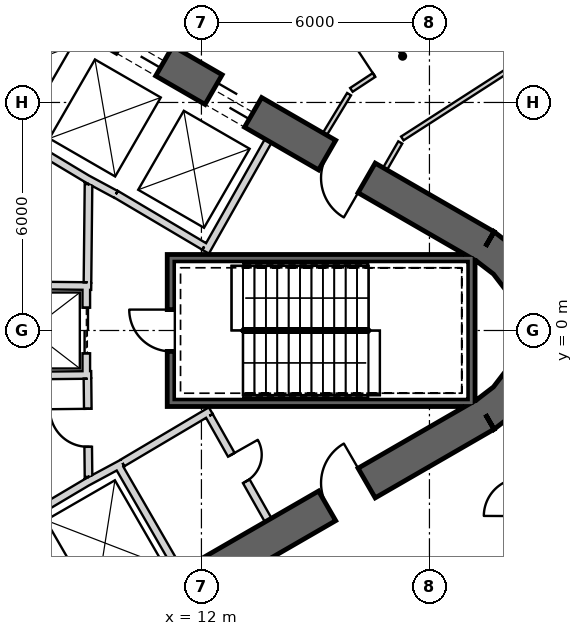
"""IFC4 building model, lengths in metres.
Left out: names, types, materials, properties, quantities, classifications, styles, units other than length and angle.
Written with IfcOpenShell. Run it as: python <this file> out.ifc"""

import sys

from ifc_helpers import new_model, si_unit, direction, frame, frame_2d, origin, place, context, subcontext, project, spatial, polyline, rectangle, outline, extrude, element, fill, save


model = new_model("IFC4")
c1 = context("Model", 3, precision=1e-05, world=origin(), true_north=direction((0.0, 1.0)))
c2 = subcontext(c1, "Body", "Model", "MODEL_VIEW")
j1 = project(units=[si_unit("LENGTHUNIT", "METRE"), si_unit("PLANEANGLEUNIT", "RADIAN")], contexts=[c1])
p1 = place(None, origin())
s1 = spatial("IfcSite", under=j1, at=p1, CompositionType="ELEMENT")
p2 = place(p1, origin())
s2 = spatial("IfcBuilding", under=s1, at=p2, CompositionType="ELEMENT")
p3 = place(p2, origin())
s3 = spatial("IfcBuildingStorey", under=s2, at=p3, CompositionType="ELEMENT", Elevation=0.0)
p4 = place(p3, frame((19.475, 2.208, 0.0), z_axis=(0.0, 0.0, 1.0), x_axis=(-0.866028369851, 0.499994862586, 0.0)))
e1 = element("IfcWall", 1, at=p4, inside=s3, PredefinedType="SHEAR", context=c2, shape_type="SweptSolid", body=[
    extrude(rectangle(XDim=31.523, YDim=0.9, at=frame_2d((15.762, 0.0))), origin(), (0.0, 0.0, 1.0), 9.0),
])
p5 = place(p4, frame((7.062, 0.0, 0.0)))
e2 = element("IfcOpeningElement", 2, at=p5, cuts=e1, PredefinedType="OPENING", context=c2, shape_type="SweptSolid", body=[
    extrude(rectangle(XDim=1.2, YDim=2.4, at=frame_2d((0.6, 1.2))), frame((0.0, 0.46, 0.0), z_axis=(0.0, -1.0, 0.0), x_axis=(1.0, 0.0, 0.0)), (0.0, 0.0, 1.0), 0.92),
])
p6 = place(p4, frame((9.762, 0.0, 0.0)))
e3 = element("IfcOpeningElement", 3, at=p6, cuts=e1, PredefinedType="OPENING", context=c2, shape_type="SweptSolid", body=[
    extrude(rectangle(XDim=1.2, YDim=2.4, at=frame_2d((0.6, 1.2))), frame((0.0, 0.46, 0.0), z_axis=(0.0, -1.0, 0.0), x_axis=(1.0, 0.0, 0.0)), (0.0, 0.0, 1.0), 0.92),
])
p7 = place(p4, frame((12.462, 0.0, 0.0)))
e4 = element("IfcOpeningElement", 4, at=p7, cuts=e1, PredefinedType="OPENING", context=c2, shape_type="SweptSolid", body=[
    extrude(rectangle(XDim=1.2, YDim=2.4, at=frame_2d((0.6, 1.2))), frame((0.0, 0.46, 0.0), z_axis=(0.0, -1.0, 0.0), x_axis=(1.0, 0.0, 0.0)), (0.0, 0.0, 1.0), 0.92),
])
p8 = place(p4, frame((15.162, 0.0, 0.0)))
e5 = element("IfcOpeningElement", 5, at=p8, cuts=e1, PredefinedType="OPENING", context=c2, shape_type="SweptSolid", body=[
    extrude(rectangle(XDim=1.2, YDim=2.4, at=frame_2d((0.6, 1.2))), frame((0.0, 0.46, 0.0), z_axis=(0.0, -1.0, 0.0), x_axis=(1.0, 0.0, 0.0)), (0.0, 0.0, 1.0), 0.92),
])
p9 = place(p4, frame((17.862, 0.0, 0.0)))
e6 = element("IfcOpeningElement", 6, at=p9, cuts=e1, PredefinedType="OPENING", context=c2, shape_type="SweptSolid", body=[
    extrude(rectangle(XDim=1.2, YDim=2.4, at=frame_2d((0.6, 1.2))), frame((0.0, 0.46, 0.0), z_axis=(0.0, -1.0, 0.0), x_axis=(1.0, 0.0, 0.0)), (0.0, 0.0, 1.0), 0.92),
])
p10 = place(p4, frame((20.562, 0.0, 0.0)))
e7 = element("IfcOpeningElement", 7, at=p10, cuts=e1, PredefinedType="OPENING", context=c2, shape_type="SweptSolid", body=[
    extrude(rectangle(XDim=1.2, YDim=2.4, at=frame_2d((0.6, 1.2))), frame((0.0, 0.46, 0.0), z_axis=(0.0, -1.0, 0.0), x_axis=(1.0, 0.0, 0.0)), (0.0, 0.0, 1.0), 0.92),
])
p11 = place(p4, frame((23.262, 0.0, 0.0)))
e8 = element("IfcOpeningElement", 8, at=p11, cuts=e1, PredefinedType="OPENING", context=c2, shape_type="SweptSolid", body=[
    extrude(rectangle(XDim=1.2, YDim=2.4, at=frame_2d((0.6, 1.2))), frame((0.0, 0.46, 0.0), z_axis=(0.0, -1.0, 0.0), x_axis=(1.0, 0.0, 0.0)), (0.0, 0.0, 1.0), 0.92),
])
p12 = place(p4, frame((3.612, 0.0, 0.0)))
e9 = element("IfcOpeningElement", 9, at=p12, cuts=e1, PredefinedType="OPENING", context=c2, shape_type="SweptSolid", body=[
    extrude(rectangle(XDim=1.2, YDim=2.4, at=frame_2d((0.6, 1.2))), frame((0.0, 0.46, 0.0), z_axis=(0.0, -1.0, 0.0), x_axis=(1.0, 0.0, 0.0)), (0.0, 0.0, 1.0), 0.92),
])
p13 = place(p4, frame((26.712, 0.0, 0.0)))
e10 = element("IfcOpeningElement", 10, at=p13, cuts=e1, PredefinedType="OPENING", context=c2, shape_type="SweptSolid", body=[
    extrude(rectangle(XDim=1.2, YDim=2.4, at=frame_2d((0.6, 1.2))), frame((0.0, 0.46, 0.0), z_axis=(0.0, -1.0, 0.0), x_axis=(1.0, 0.0, 0.0)), (0.0, 0.0, 1.0), 0.92),
])
p14 = place(p3, frame((-7.825, -17.97, 0.0), z_axis=(0.0, 0.0, 1.0), x_axis=(0.866028369851, 0.499994862586, 0.0)))
e11 = element("IfcWall", 11, at=p14, inside=s3, PredefinedType="SHEAR", context=c2, shape_type="SweptSolid", body=[
    extrude(rectangle(XDim=31.523, YDim=0.9, at=frame_2d((15.762, 0.0))), origin(), (0.0, 0.0, 1.0), 9.0),
])
p15 = place(p14, frame((7.062, 0.0, 0.0)))
e12 = element("IfcOpeningElement", 12, at=p15, cuts=e11, PredefinedType="OPENING", context=c2, shape_type="SweptSolid", body=[
    extrude(rectangle(XDim=1.2, YDim=2.4, at=frame_2d((0.6, 1.2))), frame((0.0, 0.46, 0.0), z_axis=(0.0, -1.0, 0.0), x_axis=(1.0, 0.0, 0.0)), (0.0, 0.0, 1.0), 0.92),
])
p16 = place(p14, frame((9.762, 0.0, 0.0)))
e13 = element("IfcOpeningElement", 13, at=p16, cuts=e11, PredefinedType="OPENING", context=c2, shape_type="SweptSolid", body=[
    extrude(rectangle(XDim=1.2, YDim=2.4, at=frame_2d((0.6, 1.2))), frame((0.0, 0.46, 0.0), z_axis=(0.0, -1.0, 0.0), x_axis=(1.0, 0.0, 0.0)), (0.0, 0.0, 1.0), 0.92),
])
p17 = place(p14, frame((12.462, 0.0, 0.0)))
e14 = element("IfcOpeningElement", 14, at=p17, cuts=e11, PredefinedType="OPENING", context=c2, shape_type="SweptSolid", body=[
    extrude(rectangle(XDim=1.2, YDim=2.4, at=frame_2d((0.6, 1.2))), frame((0.0, 0.46, 0.0), z_axis=(0.0, -1.0, 0.0), x_axis=(1.0, 0.0, 0.0)), (0.0, 0.0, 1.0), 0.92),
])
p18 = place(p14, frame((15.162, 0.0, 0.0)))
e15 = element("IfcOpeningElement", 15, at=p18, cuts=e11, PredefinedType="OPENING", context=c2, shape_type="SweptSolid", body=[
    extrude(rectangle(XDim=1.2, YDim=2.4, at=frame_2d((0.6, 1.2))), frame((0.0, 0.46, 0.0), z_axis=(0.0, -1.0, 0.0), x_axis=(1.0, 0.0, 0.0)), (0.0, 0.0, 1.0), 0.92),
])
p19 = place(p14, frame((17.862, 0.0, 0.0)))
e16 = element("IfcOpeningElement", 16, at=p19, cuts=e11, PredefinedType="OPENING", context=c2, shape_type="SweptSolid", body=[
    extrude(rectangle(XDim=1.2, YDim=2.4, at=frame_2d((0.6, 1.2))), frame((0.0, 0.46, 0.0), z_axis=(0.0, -1.0, 0.0), x_axis=(1.0, 0.0, 0.0)), (0.0, 0.0, 1.0), 0.92),
])
p20 = place(p14, frame((20.562, 0.0, 0.0)))
e17 = element("IfcOpeningElement", 17, at=p20, cuts=e11, PredefinedType="OPENING", context=c2, shape_type="SweptSolid", body=[
    extrude(rectangle(XDim=1.2, YDim=2.4, at=frame_2d((0.6, 1.2))), frame((0.0, 0.46, 0.0), z_axis=(0.0, -1.0, 0.0), x_axis=(1.0, 0.0, 0.0)), (0.0, 0.0, 1.0), 0.92),
])
p21 = place(p14, frame((26.712, 0.0, 0.0)))
e18 = element("IfcOpeningElement", 18, at=p21, cuts=e11, PredefinedType="OPENING", context=c2, shape_type="SweptSolid", body=[
    extrude(rectangle(XDim=1.2, YDim=2.4, at=frame_2d((0.6, 1.2))), frame((0.0, 0.46, 0.0), z_axis=(0.0, -1.0, 0.0), x_axis=(1.0, 0.0, 0.0)), (0.0, 0.0, 1.0), 0.92),
])
p22 = place(p14, frame((3.612, 0.0, 0.0)))
e19 = element("IfcOpeningElement", 19, at=p22, cuts=e11, PredefinedType="OPENING", context=c2, shape_type="SweptSolid", body=[
    extrude(rectangle(XDim=1.2, YDim=2.4, at=frame_2d((0.6, 1.2))), frame((0.0, 0.46, 0.0), z_axis=(0.0, -1.0, 0.0), x_axis=(1.0, 0.0, 0.0)), (0.0, 0.0, 1.0), 0.92),
])
p23 = place(p3, origin())
e20 = element("IfcWall", 20, at=p23, inside=s3, PredefinedType="SHEAR", context=c2, shape_type="SweptSolid", body=[
    extrude(outline(polyline([(19.7, -2.598), (20.321, -2.121), (20.798, -1.5), (21.098, -0.777), (21.2, 0.0), (21.098, 0.777), (20.798, 1.5), (20.321, 2.121), (19.7, 2.598), (19.25, 1.819), (19.685, 1.485), (20.019, 1.05), (20.229, 0.543), (20.3, 0.0), (20.229, -0.543), (20.019, -1.05), (19.685, -1.485), (19.25, -1.819), (19.7, -2.598)])), origin(), (0.0, 0.0, 1.0), 9.0),
])
p24 = place(p3, frame((12.11, 2.073, 0.0), z_axis=(0.0, 0.0, 1.0), x_axis=(0.49196600604, 0.870614408852, 0.0)))
e21 = element("IfcWall", 21, at=p24, inside=s3, PredefinedType="PLUMBINGWALL", context=c2, shape_type="SweptSolid", body=[
    extrude(rectangle(XDim=3.35, YDim=0.2, at=frame_2d((1.675, 0.0))), origin(), (0.0, 0.0, 1.0), 8.7),
])
p25 = place(p3, frame((12.073, 2.211, 0.0), z_axis=(0.0, 0.0, 1.0), x_axis=(-0.860438357912, 0.509554542943, 0.0)))
e22 = element("IfcWall", 22, at=p25, inside=s3, PredefinedType="PLUMBINGWALL", context=c2, shape_type="SweptSolid", body=[
    extrude(rectangle(XDim=2.7, YDim=0.2, at=frame_2d((1.35, 0.0))), origin(), (0.0, 0.0, 1.0), 8.7),
])
p26 = place(p3, frame((9.748, 3.583, 0.0), z_axis=(0.0, 0.0, 1.0), x_axis=(-0.880917147855, 0.473270513147, 0.0)))
e23 = element("IfcWall", 23, at=p26, inside=s3, PredefinedType="PLUMBINGWALL", context=c2, shape_type="SweptSolid", body=[
    extrude(rectangle(XDim=0.878, YDim=0.2, at=frame_2d((0.439, 0.0))), origin(), (0.0, 0.0, 1.0), 8.7),
])
p27 = place(p3, frame((9.079, 3.937, 0.0), z_axis=(0.0, 0.0, 1.0), x_axis=(-0.857516281273, 0.51445682749, 0.0)))
e24 = element("IfcWall", 24, at=p27, inside=s3, PredefinedType="PLUMBINGWALL", context=c2, shape_type="SweptSolid", body=[
    extrude(rectangle(XDim=1.845, YDim=0.2, at=frame_2d((0.922, 0.0))), origin(), (0.0, 0.0, 1.0), 8.7),
])
p28 = place(p3, frame((9.795, -3.525, 0.0), z_axis=(0.0, 0.0, 1.0), x_axis=(0.499984717929, -0.866034226713, 0.0)))
e25 = element("IfcWall", 25, at=p28, inside=s3, PredefinedType="PLUMBINGWALL", context=c2, shape_type="SweptSolid", body=[
    extrude(rectangle(XDim=3.25, YDim=0.2, at=frame_2d((1.625, 0.0))), origin(), (0.0, 0.0, 1.0), 8.7),
])
p29 = place(p3, frame((8.974, -3.999, 0.0), z_axis=(0.0, 0.0, 1.0), x_axis=(0.880907015104, 0.473289373154, 0.0)))
e26 = element("IfcWall", 26, at=p29, inside=s3, PredefinedType="PLUMBINGWALL", context=c2, shape_type="SweptSolid", body=[
    extrude(rectangle(XDim=1.078, YDim=0.2, at=frame_2d((0.539, 0.0))), origin(), (0.0, 0.0, 1.0), 8.7),
])
p30 = place(p3, frame((7.493, -4.878, 0.0), z_axis=(0.0, 0.0, 1.0), x_axis=(0.859981807212, 0.510324691999, 0.0)))
e27 = element("IfcWall", 27, at=p30, inside=s3, PredefinedType="PLUMBINGWALL", context=c2, shape_type="SweptSolid", body=[
    extrude(rectangle(XDim=1.845, YDim=0.2, at=frame_2d((0.922, 0.0))), origin(), (0.0, 0.0, 1.0), 8.7),
])
p31 = place(p3, frame((19.2, 1.9, -0.4), z_axis=(0.0, 0.0, 1.0), x_axis=(-1.0, 0.0, 0.0)))
e28 = element("IfcWall", 28, at=p31, inside=s3, PredefinedType="SHEAR", context=c2, shape_type="SweptSolid", body=[
    extrude(rectangle(XDim=8.1, YDim=0.2, at=frame_2d((4.05, 0.0))), origin(), (0.0, 0.0, 1.0), 9.1),
])
p32 = place(p3, frame((19.1, -2.0, -0.4), z_axis=(0.0, 0.0, 1.0), x_axis=(0.0, 1.0, 0.0)))
e29 = element("IfcWall", 29, at=p32, inside=s3, PredefinedType="SHEAR", context=c2, shape_type="SweptSolid", body=[
    extrude(rectangle(XDim=3.8, YDim=0.2, at=frame_2d((1.9, 0.0))), origin(), (0.0, 0.0, 1.0), 9.1),
])
p33 = place(p3, frame((11.1, -1.9, -0.4), z_axis=(0.0, 0.0, 1.0), x_axis=(1.0, 0.0, 0.0)))
e30 = element("IfcWall", 30, at=p33, inside=s3, PredefinedType="SHEAR", context=c2, shape_type="SweptSolid", body=[
    extrude(rectangle(XDim=7.9, YDim=0.2, at=frame_2d((3.95, 0.0))), origin(), (0.0, 0.0, 1.0), 9.1),
])
p34 = place(p3, frame((11.2, -1.8, -0.4), z_axis=(0.0, 0.0, 1.0), x_axis=(0.0, 1.0, 0.0)))
e31 = element("IfcWall", 31, at=p34, inside=s3, PredefinedType="SHEAR", context=c2, shape_type="SweptSolid", body=[
    extrude(rectangle(XDim=3.6, YDim=0.2, at=frame_2d((1.8, 0.0))), origin(), (0.0, 0.0, 1.0), 9.1),
])
p35 = place(p34, frame((1.25, 0.0, 0.4)))
e32 = element("IfcOpeningElement", 32, at=p35, cuts=e31, PredefinedType="OPENING", context=c2, shape_type="SweptSolid", body=[
    extrude(rectangle(XDim=1.1, YDim=2.1, at=frame_2d((0.55, 1.05))), frame((0.0, 0.11, 0.0), z_axis=(0.0, -1.0, 0.0), x_axis=(1.0, 0.0, 0.0)), (0.0, 0.0, 1.0), 0.22),
])
p36 = place(p3, frame((8.97, 1.2, 0.0), z_axis=(0.0, 0.0, 1.0), x_axis=(0.0, -1.0, 0.0)))
e33 = element("IfcWall", 33, at=p36, inside=s3, PredefinedType="PLUMBINGWALL", context=c2, shape_type="SweptSolid", body=[
    extrude(rectangle(XDim=2.4, YDim=0.2, at=frame_2d((1.2, 0.0))), origin(), (0.0, 0.0, 1.0), 8.7),
])
p37 = place(p36, frame((0.6, 0.0, 0.0)))
e34 = element("IfcOpeningElement", 34, at=p37, cuts=e33, PredefinedType="OPENING", context=c2, shape_type="SweptSolid", body=[
    extrude(rectangle(XDim=1.2, YDim=2.4, at=frame_2d((0.6, 1.2))), frame((0.0, 0.11, 0.0), z_axis=(0.0, -1.0, 0.0), x_axis=(1.0, 0.0, 0.0)), (0.0, 0.0, 1.0), 0.22),
])
p38 = place(p3, frame((6.0, 1.2, 0.0), z_axis=(0.0, 0.0, 1.0), x_axis=(0.999949988, -0.010001074852, 0.0)))
e35 = element("IfcWall", 35, at=p38, inside=s3, PredefinedType="PLUMBINGWALL", context=c2, shape_type="SweptSolid", body=[
    extrude(rectangle(XDim=3.1, YDim=0.2, at=frame_2d((1.55, 0.0))), origin(), (0.0, 0.0, 1.0), 8.7),
])
p39 = place(p3, frame((5.9, -1.201, 0.0), z_axis=(0.0, 0.0, 1.0), x_axis=(0.999950064753, 0.009993397809, 0.0)))
e36 = element("IfcWall", 36, at=p39, inside=s3, PredefinedType="PLUMBINGWALL", context=c2, shape_type="SweptSolid", body=[
    extrude(rectangle(XDim=3.2, YDim=0.2, at=frame_2d((1.6, 0.0))), origin(), (0.0, 0.0, 1.0), 8.7),
])
p40 = place(p3, frame((12.245, -2.109, 0.0), z_axis=(0.0, 0.0, 1.0), x_axis=(-0.860414880418, -0.509594185166, 0.0)))
e37 = element("IfcWall", 37, at=p40, inside=s3, PredefinedType="PARTITIONING", context=c2, shape_type="SweptSolid", body=[
    extrude(rectangle(XDim=2.7, YDim=0.2, at=frame_2d((1.35, 0.0))), origin(), (0.0, 0.0, 1.0), 8.7),
])
p41 = place(p3, frame((13.758, -4.99, 0.0), z_axis=(0.0, 0.0, 1.0), x_axis=(-0.491993409184, 0.87059892334, 0.0)))
e38 = element("IfcWall", 38, at=p41, inside=s3, PredefinedType="PARTITIONING", context=c2, shape_type="SweptSolid", body=[
    extrude(rectangle(XDim=3.15, YDim=0.2, at=frame_2d((1.575, 0.0))), origin(), (0.0, 0.0, 1.0), 8.7),
])
p42 = place(p41, frame((1.175, 0.0, 0.0)))
e39 = element("IfcOpeningElement", 39, at=p42, cuts=e38, PredefinedType="OPENING", context=c2, shape_type="SweptSolid", body=[
    extrude(rectangle(XDim=0.8, YDim=2.1, at=frame_2d((0.4, 1.05))), frame((0.0, 0.11, 0.0), z_axis=(0.0, -1.0, 0.0), x_axis=(1.0, 0.0, 0.0)), (0.0, 0.0, 1.0), 0.22),
])
p43 = place(p3, frame((9.001, 1.27, 0.0), z_axis=(0.0, 0.0, 1.0), x_axis=(0.010784614026, 0.999941844359, 0.0)))
e40 = element("IfcWall", 40, at=p43, inside=s3, PredefinedType="PARTITIONING", context=c2, shape_type="SweptSolid", body=[
    extrude(rectangle(XDim=2.581, YDim=0.2, at=frame_2d((1.291, 0.0))), origin(), (0.0, 0.0, 1.0), 8.7),
])
p44 = place(p3, frame((9.029, -3.851, 0.0), z_axis=(0.0, 0.0, 1.0), x_axis=(-0.010783593937, 0.99994185536, 0.0)))
e41 = element("IfcWall", 41, at=p44, inside=s3, PredefinedType="PARTITIONING", context=c2, shape_type="SweptSolid", body=[
    extrude(rectangle(XDim=2.581, YDim=0.2, at=frame_2d((1.291, 0.0))), origin(), (0.0, 0.0, 1.0), 8.7),
])
p45 = place(p44, frame((0.791, 0.0, 0.0)))
e42 = element("IfcOpeningElement", 42, at=p45, cuts=e41, PredefinedType="OPENING", context=c2, shape_type="SweptSolid", body=[
    extrude(rectangle(XDim=1.0, YDim=2.1, at=frame_2d((0.5, 1.05))), frame((0.0, 0.11, 0.0), z_axis=(0.0, -1.0, 0.0), x_axis=(1.0, 0.0, 0.0)), (0.0, 0.0, 1.0), 0.22),
])
p46 = place(p3, frame((15.946, 6.331, 0.0), z_axis=(0.0, 0.0, 1.0), x_axis=(0.835422846106, 0.549607740306, 0.0)))
e43 = element("IfcWall", 43, at=p46, inside=s3, PredefinedType="PARTITIONING", context=c2, shape_type="SweptSolid", body=[
    extrude(rectangle(XDim=3.071, YDim=0.12, at=frame_2d((1.535, 0.0))), origin(), (0.0, 0.0, 1.0), 8.7),
])
p47 = place(p46, frame((0.713, 0.0, 0.0)))
e44 = element("IfcOpeningElement", 44, at=p47, cuts=e43, PredefinedType="OPENING", context=c2, shape_type="SweptSolid", body=[
    extrude(rectangle(XDim=1.8, YDim=2.1, at=frame_2d((0.9, 1.05))), frame((0.0, 0.07, 0.0), z_axis=(0.0, -1.0, 0.0), x_axis=(1.0, 0.0, 0.0)), (0.0, 0.0, 1.0), 0.14),
])
p48 = place(p3, frame((15.247, 5.169, 0.0), z_axis=(0.0, 0.0, 1.0), x_axis=(0.51893145636, 0.85481585362, 0.0)))
e45 = element("IfcWall", 45, at=p48, inside=s3, PredefinedType="PARTITIONING", context=c2, shape_type="SweptSolid", body=[
    extrude(rectangle(XDim=1.228, YDim=0.12, at=frame_2d((0.614, 0.0))), origin(), (0.0, 0.0, 1.0), 8.7),
])
p49 = place(p3, frame((17.286, 5.053, 0.0), z_axis=(0.0, 0.0, 1.0), x_axis=(0.840791306929, 0.541359379888, 0.0)))
e46 = element("IfcWall", 46, at=p49, inside=s3, PredefinedType="PARTITIONING", context=c2, shape_type="SweptSolid", body=[
    extrude(rectangle(XDim=12.546, YDim=0.12, at=frame_2d((6.273, 0.0))), origin(), (0.0, 0.0, 1.0), 7.88),
])
p50 = place(p49, frame((5.377, 0.0, 0.0)))
e47 = element("IfcOpeningElement", 47, at=p50, cuts=e46, PredefinedType="OPENING", context=c2, shape_type="SweptSolid", body=[
    extrude(rectangle(XDim=1.8, YDim=2.1, at=frame_2d((0.9, 1.05))), frame((0.0, 0.07, 0.0), z_axis=(0.0, -1.0, 0.0), x_axis=(1.0, 0.0, 0.0)), (0.0, 0.0, 1.0), 0.14),
])
p51 = place(p3, frame((17.232, 4.948, 0.0), z_axis=(0.0, 0.0, 1.0), x_axis=(-0.500120931396, -0.865955572752, 0.0)))
e48 = element("IfcWall", 48, at=p51, inside=s3, PredefinedType="PARTITIONING", context=c2, shape_type="SweptSolid", body=[
    extrude(rectangle(XDim=0.831, YDim=0.12, at=frame_2d((0.416, 0.0))), origin(), (0.0, 0.0, 1.0), 7.88),
])
p52 = place(p35, origin())
e49 = element("IfcDoor", 49, at=p52, inside=s3, OperationType="SINGLE_SWING_RIGHT", PredefinedType="USERDEFINED", context=c2, shape_type="SweptSolid", body=[
    extrude(rectangle(XDim=1.1, YDim=2.1, at=frame_2d((0.55, 1.05))), frame((0.0, 0.025, 0.0), z_axis=(0.0, -1.0, 0.0), x_axis=(1.0, 0.0, 0.0)), (0.0, 0.0, 1.0), 0.05),
])
fill(e32, e49)
p53 = place(p45, origin())
e50 = element("IfcDoor", 50, at=p53, inside=s3, OperationType="SINGLE_SWING_RIGHT", PredefinedType="USERDEFINED", context=c2, shape_type="SweptSolid", body=[
    extrude(rectangle(XDim=1.0, YDim=2.1, at=frame_2d((0.5, 1.05))), frame((0.0, 0.025, 0.0), z_axis=(0.0, -1.0, 0.0), x_axis=(1.0, 0.0, 0.0)), (0.0, 0.0, 1.0), 0.05),
])
fill(e42, e50)
p54 = place(p37, origin())
e51 = element("IfcDoor", 51, at=p54, inside=s3, OperationType="SLIDING_TO_LEFT", PredefinedType="USERDEFINED", context=c2, shape_type="SweptSolid", body=[
    extrude(rectangle(XDim=1.2, YDim=2.4, at=frame_2d((0.6, 1.2))), frame((0.0, 0.025, 0.0), z_axis=(0.0, -1.0, 0.0), x_axis=(1.0, 0.0, 0.0)), (0.0, 0.0, 1.0), 0.05),
])
fill(e34, e51)
p55 = place(p42, origin())
e52 = element("IfcDoor", 52, at=p55, inside=s3, OperationType="SINGLE_SWING_RIGHT", PredefinedType="USERDEFINED", context=c2, shape_type="SweptSolid", body=[
    extrude(rectangle(XDim=0.8, YDim=2.1, at=frame_2d((0.4, 1.05))), frame((0.0, 0.025, 0.0), z_axis=(0.0, -1.0, 0.0), x_axis=(1.0, 0.0, 0.0)), (0.0, 0.0, 1.0), 0.05),
])
fill(e39, e52)
p56 = place(p47, origin())
e53 = element("IfcDoor", 53, at=p56, inside=s3, OperationType="DOUBLE_DOOR_SINGLE_SWING", PredefinedType="NOTDEFINED", context=c2, shape_type="SweptSolid", body=[
    extrude(rectangle(XDim=1.8, YDim=2.1, at=frame_2d((0.9, 1.05))), frame((0.0, 0.025, 0.0), z_axis=(0.0, -1.0, 0.0), x_axis=(1.0, 0.0, 0.0)), (0.0, 0.0, 1.0), 0.05),
])
fill(e44, e53)
p57 = place(p5, origin())
e54 = element("IfcDoor", 54, at=p57, inside=s3, OperationType="SLIDING_TO_LEFT", PredefinedType="USERDEFINED", context=c2, shape_type="SweptSolid", body=[
    extrude(rectangle(XDim=1.2, YDim=2.4, at=frame_2d((0.6, 1.2))), frame((0.0, 0.025, 0.0), z_axis=(0.0, -1.0, 0.0), x_axis=(1.0, 0.0, 0.0)), (0.0, 0.0, 1.0), 0.05),
])
fill(e2, e54)
p58 = place(p6, origin())
e55 = element("IfcDoor", 55, at=p58, inside=s3, OperationType="SLIDING_TO_LEFT", PredefinedType="USERDEFINED", context=c2, shape_type="SweptSolid", body=[
    extrude(rectangle(XDim=1.2, YDim=2.4, at=frame_2d((0.6, 1.2))), frame((0.0, 0.025, 0.0), z_axis=(0.0, -1.0, 0.0), x_axis=(1.0, 0.0, 0.0)), (0.0, 0.0, 1.0), 0.05),
])
fill(e3, e55)
p59 = place(p21, origin())
e56 = element("IfcDoor", 56, at=p59, inside=s3, OperationType="SINGLE_SWING_RIGHT", PredefinedType="USERDEFINED", context=c2, shape_type="SweptSolid", body=[
    extrude(rectangle(XDim=1.2, YDim=2.4, at=frame_2d((0.6, 1.2))), frame((0.0, 0.025, 0.0), z_axis=(0.0, -1.0, 0.0), x_axis=(1.0, 0.0, 0.0)), (0.0, 0.0, 1.0), 0.05),
])
fill(e18, e56)
p60 = place(p12, origin())
e57 = element("IfcDoor", 57, at=p60, inside=s3, OperationType="SINGLE_SWING_LEFT", PredefinedType="USERDEFINED", context=c2, shape_type="SweptSolid", body=[
    extrude(rectangle(XDim=1.2, YDim=2.4, at=frame_2d((0.6, 1.2))), frame((0.0, 0.025, 0.0), z_axis=(0.0, -1.0, 0.0), x_axis=(1.0, 0.0, 0.0)), (0.0, 0.0, 1.0), 0.05),
])
fill(e9, e57)
save(model, sys.argv[1])
